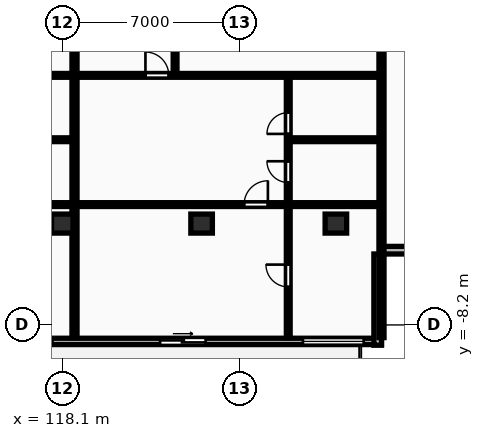
"""IFC4 building model, lengths in metres.
Left out: names, types, materials, properties, quantities, classifications, styles, units other than length and angle.
Written with IfcOpenShell. Run it as: python <this file> out.ifc"""

import sys

from ifc_helpers import new_model, si_unit, direction, frame, frame_2d, origin, origin_2d, place, context, subcontext, project, spatial, rectangle, extrude, element, fill, save


model = new_model("IFC4")
c1 = context("Model", 3, precision=1e-05, world=origin(), true_north=direction((0.0, 1.0)))
c2 = subcontext(c1, "Body", "Model", "MODEL_VIEW")
j1 = project(units=[si_unit("LENGTHUNIT", "METRE"), si_unit("PLANEANGLEUNIT", "RADIAN")], contexts=[c1])
p1 = place(None, origin())
s1 = spatial("IfcSite", under=j1, at=p1, CompositionType="ELEMENT")
p2 = place(p1, origin())
s2 = spatial("IfcBuilding", under=s1, at=p2, CompositionType="ELEMENT")
p3 = place(p2, frame((0.0, 0.0, 113.3)))
s3 = spatial("IfcBuildingStorey", under=s2, at=p3, CompositionType="ELEMENT", Elevation=113.3)
for number, where, z_axis, x_axis in (
    (1, (118.1, -4.2, 0.0), (0.0, 0.0, 1.0), (1.0, 0.0, 0.0)),
    (2, (123.6, -4.2, 0.0), (0.0, 0.0, 1.0), (1.0, 0.0, 0.0)),
    (3, (128.9, -4.2, 0.0), (0.0, 0.0, 1.0), (1.0, 0.0, 0.0)),
):
    element("IfcColumn", number, at=place(p3, frame(where, z_axis=z_axis, x_axis=x_axis)), inside=s3, PredefinedType="COLUMN", context=c2, shape_type="SweptSolid", body=[
        extrude(rectangle(XDim=0.85, YDim=0.75, at=origin_2d()), origin(), (0.0, 0.0, 1.0), 3.25),
    ])
p4 = place(p3, frame((72.7, -8.85, 0.0), z_axis=(0.0, 0.0, 1.0), x_axis=(1.0, 0.0, 0.0)))
e4 = element("IfcWall", 4, at=p4, inside=s3, PredefinedType="STANDARD", context=c2, shape_type="SweptSolid", body=[
    extrude(rectangle(XDim=58.0, YDim=0.25, at=frame_2d((29.0, 0.0))), origin(), (0.0, 0.0, 1.0), 2.97),
])
p5 = place(p4, frame((3.358, 0.0, 0.0)))
e5 = element("IfcOpeningElement", 5, at=p5, cuts=e4, PredefinedType="OPENING", context=c2, shape_type="SweptSolid", body=[
    extrude(rectangle(XDim=1.8, YDim=2.2, at=frame_2d((0.9, 1.1))), frame((0.0, 0.135, 0.0), z_axis=(0.0, -1.0, 0.0), x_axis=(1.0, 0.0, 0.0)), (0.0, 0.0, 1.0), 0.27),
])
p6 = place(p4, frame((12.755, 0.0, 0.85)))
e6 = element("IfcOpeningElement", 6, at=p6, cuts=e4, PredefinedType="OPENING", context=c2, shape_type="SweptSolid", body=[
    extrude(rectangle(XDim=2.4, YDim=1.9, at=frame_2d((1.2, 0.95))), frame((0.0, 0.135, 0.0), z_axis=(0.0, -1.0, 0.0), x_axis=(1.0, 0.0, 0.0)), (0.0, 0.0, 1.0), 0.27),
])
p7 = place(p4, frame((23.617, 0.0, 0.0)))
e7 = element("IfcOpeningElement", 7, at=p7, cuts=e4, PredefinedType="OPENING", context=c2, shape_type="SweptSolid", body=[
    extrude(rectangle(XDim=1.8, YDim=2.2, at=frame_2d((0.9, 1.1))), frame((0.0, 0.135, 0.0), z_axis=(0.0, -1.0, 0.0), x_axis=(1.0, 0.0, 0.0)), (0.0, 0.0, 1.0), 0.27),
])
p8 = place(p4, frame((29.705, 0.0, 0.85)))
e8 = element("IfcOpeningElement", 8, at=p8, cuts=e4, PredefinedType="OPENING", context=c2, shape_type="SweptSolid", body=[
    extrude(rectangle(XDim=1.8, YDim=1.8, at=frame_2d((0.9, 0.9))), frame((0.0, 0.135, 0.0), z_axis=(0.0, -1.0, 0.0), x_axis=(1.0, 0.0, 0.0)), (0.0, 0.0, 1.0), 0.27),
])
p9 = place(p4, frame((36.417, 0.0, 0.0)))
e9 = element("IfcOpeningElement", 9, at=p9, cuts=e4, PredefinedType="OPENING", context=c2, shape_type="SweptSolid", body=[
    extrude(rectangle(XDim=1.8, YDim=2.2, at=frame_2d((0.9, 1.1))), frame((0.0, 0.135, 0.0), z_axis=(0.0, -1.0, 0.0), x_axis=(1.0, 0.0, 0.0)), (0.0, 0.0, 1.0), 0.27),
])
p10 = place(p4, frame((43.213, 0.0, 0.85)))
e10 = element("IfcOpeningElement", 10, at=p10, cuts=e4, PredefinedType="OPENING", context=c2, shape_type="SweptSolid", body=[
    extrude(rectangle(XDim=1.8, YDim=1.8, at=frame_2d((0.9, 0.9))), frame((0.0, 0.135, 0.0), z_axis=(0.0, -1.0, 0.0), x_axis=(1.0, 0.0, 0.0)), (0.0, 0.0, 1.0), 0.27),
])
p11 = place(p4, frame((49.262, 0.0, 0.0)))
e11 = element("IfcOpeningElement", 11, at=p11, cuts=e4, PredefinedType="OPENING", context=c2, shape_type="SweptSolid", body=[
    extrude(rectangle(XDim=1.8, YDim=2.2, at=frame_2d((0.9, 1.1))), frame((0.0, 0.135, 0.0), z_axis=(0.0, -1.0, 0.0), x_axis=(1.0, 0.0, 0.0)), (0.0, 0.0, 1.0), 0.27),
])
p12 = place(p4, frame((54.9, 0.0, 0.85)))
e12 = element("IfcOpeningElement", 12, at=p12, cuts=e4, PredefinedType="OPENING", context=c2, shape_type="SweptSolid", body=[
    extrude(rectangle(XDim=2.4, YDim=1.9, at=frame_2d((1.2, 0.95))), frame((0.0, 0.135, 0.0), z_axis=(0.0, -1.0, 0.0), x_axis=(1.0, 0.0, 0.0)), (0.0, 0.0, 1.0), 0.27),
])
for number, where, z_axis, x_axis in (
    (13, (130.55, -9.0, 0.0), (0.0, 0.0, 1.0), (0.0, 1.0, 0.0)),
    (14, (130.7, -5.25, 0.0), (0.0, 0.0, 1.0), (1.0, 0.0, 0.0)),
):
    element("IfcWall", number, at=place(p3, frame(where, z_axis=z_axis, x_axis=x_axis)), inside=s3, PredefinedType="STANDARD", context=c2, shape_type="SweptSolid", body=[
        extrude(rectangle(XDim=3.6, YDim=0.3, at=frame_2d((1.8, 0.0))), origin(), (0.0, 0.0, 1.0), 2.97),
    ])
for number, where, z_axis, x_axis in (
    (15, (130.7, -8.7, 0.0), (0.0, 0.0, 1.0), (0.0, 1.0, 0.0)),
    (16, (118.583, -8.7, 0.0), (0.0, 0.0, 1.0), (0.0, 1.0, 0.0)),
):
    element("IfcWall", number, at=place(p3, frame(where, z_axis=z_axis, x_axis=x_axis)), inside=s3, PredefinedType="PARTITIONING", context=c2, shape_type="SweptSolid", body=[
        extrude(rectangle(XDim=24.57, YDim=0.2, at=frame_2d((12.285, 0.0))), origin(), (0.0, 0.0, 1.0), 2.97),
    ])
p13 = place(p3, frame((115.223, -0.89, 0.0), z_axis=(0.0, 0.0, 1.0), x_axis=(1.0, 0.0, 0.0)))
e17 = element("IfcWall", 17, at=p13, inside=s3, PredefinedType="PARTITIONING", context=c2, shape_type="SweptSolid", body=[
    extrude(rectangle(XDim=3.28, YDim=0.15, at=frame_2d((1.64, 0.0))), origin(), (0.0, 0.0, 1.0), 2.97),
])
p14 = place(p3, frame((104.83, 1.65, 0.0), z_axis=(0.0, 0.0, 1.0), x_axis=(1.0, 0.0, 0.0)))
e18 = element("IfcWall", 18, at=p14, inside=s3, PredefinedType="PARTITIONING", context=c2, shape_type="SweptSolid", body=[
    extrude(rectangle(XDim=13.673, YDim=0.15, at=frame_2d((6.837, 0.0))), origin(), (0.0, 0.0, 1.0), 2.97),
])
p15 = place(p14, frame((2.72, 0.0, 0.0)))
e19 = element("IfcOpeningElement", 19, at=p15, cuts=e18, PredefinedType="OPENING", context=c2, shape_type="SweptSolid", body=[
    extrude(rectangle(XDim=0.92, YDim=2.08, at=frame_2d((0.46, 1.04))), frame((0.0, 0.085, 0.0), z_axis=(0.0, -1.0, 0.0), x_axis=(1.0, 0.0, 0.0)), (0.0, 0.0, 1.0), 0.17),
])
p16 = place(p3, frame((104.83, -3.45, 0.0), z_axis=(0.0, 0.0, 1.0), x_axis=(1.0, 0.0, 0.0)))
e20 = element("IfcWall", 20, at=p16, inside=s3, PredefinedType="PARTITIONING", context=c2, shape_type="SweptSolid", body=[
    extrude(rectangle(XDim=13.673, YDim=0.15, at=frame_2d((6.837, 0.0))), origin(), (0.0, 0.0, 1.0), 2.97),
])
p17 = place(p16, frame((6.367, 0.0, 0.0)))
e21 = element("IfcOpeningElement", 21, at=p17, cuts=e20, PredefinedType="OPENING", context=c2, shape_type="SweptSolid", body=[
    extrude(rectangle(XDim=0.94, YDim=2.1, at=frame_2d((0.47, 1.05))), frame((0.0, 0.085, 0.0), z_axis=(0.0, -1.0, 0.0), x_axis=(1.0, 0.0, 0.0)), (0.0, 0.0, 1.0), 0.17),
])
p18 = place(p3, frame((122.553, 1.69, 0.0), z_axis=(0.0, 0.0, 1.0), x_axis=(0.0, 1.0, 0.0)))
e22 = element("IfcWall", 22, at=p18, inside=s3, PredefinedType="PARTITIONING", context=c2, shape_type="SweptSolid", body=[
    extrude(rectangle(XDim=14.2, YDim=0.15, at=frame_2d((7.1, 0.0))), origin(), (0.0, 0.0, 1.0), 2.97),
])
p19 = place(p18, frame((2.598, 0.0, 0.0)))
e23 = element("IfcOpeningElement", 23, at=p19, cuts=e22, PredefinedType="OPENING", context=c2, shape_type="SweptSolid", body=[
    extrude(rectangle(XDim=0.88, YDim=2.06, at=frame_2d((0.44, 1.03))), frame((0.0, 0.085, 0.0), z_axis=(0.0, -1.0, 0.0), x_axis=(1.0, 0.0, 0.0)), (0.0, 0.0, 1.0), 0.17),
])
p20 = place(p3, frame((127.08, -0.89, 0.0), z_axis=(0.0, 0.0, 1.0), x_axis=(1.0, 0.0, 0.0)))
e24 = element("IfcWall", 24, at=p20, inside=s3, PredefinedType="PARTITIONING", context=c2, shape_type="SweptSolid", body=[
    extrude(rectangle(XDim=3.54, YDim=0.15, at=frame_2d((1.77, 0.0))), origin(), (0.0, 0.0, 1.0), 2.97),
])
p21 = place(p3, frame((127.02, -8.7, 0.0), z_axis=(0.0, 0.0, 1.0), x_axis=(0.0, 1.0, 0.0)))
e25 = element("IfcWall", 25, at=p21, inside=s3, PredefinedType="PARTITIONING", context=c2, shape_type="SweptSolid", body=[
    extrude(rectangle(XDim=10.31, YDim=0.15, at=frame_2d((5.155, 0.0))), origin(), (0.0, 0.0, 1.0), 2.97),
])
p22 = place(p21, frame((6.12, 0.0, 0.0)))
e26 = element("IfcOpeningElement", 26, at=p22, cuts=e25, PredefinedType="OPENING", context=c2, shape_type="SweptSolid", body=[
    extrude(rectangle(XDim=0.84, YDim=2.04, at=frame_2d((0.42, 1.02))), frame((0.0, 0.085, 0.0), z_axis=(0.0, -1.0, 0.0), x_axis=(1.0, 0.0, 0.0)), (0.0, 0.0, 1.0), 0.17),
])
p23 = place(p21, frame((8.04, 0.0, 0.0)))
e27 = element("IfcOpeningElement", 27, at=p23, cuts=e25, PredefinedType="OPENING", context=c2, shape_type="SweptSolid", body=[
    extrude(rectangle(XDim=0.84, YDim=2.04, at=frame_2d((0.42, 1.02))), frame((0.0, 0.085, 0.0), z_axis=(0.0, -1.0, 0.0), x_axis=(1.0, 0.0, 0.0)), (0.0, 0.0, 1.0), 0.17),
])
p24 = place(p21, frame((2.001, 0.0, 0.0)))
e28 = element("IfcOpeningElement", 28, at=p24, cuts=e25, PredefinedType="OPENING", context=c2, shape_type="SweptSolid", body=[
    extrude(rectangle(XDim=0.88, YDim=2.06, at=frame_2d((0.44, 1.03))), frame((0.0, 0.085, 0.0), z_axis=(0.0, -1.0, 0.0), x_axis=(1.0, 0.0, 0.0)), (0.0, 0.0, 1.0), 0.17),
])
p25 = place(p3, frame((118.663, 1.65, 0.0), z_axis=(0.0, 0.0, 1.0), x_axis=(1.0, 0.0, 0.0)))
e29 = element("IfcWall", 29, at=p25, inside=s3, PredefinedType="PARTITIONING", context=c2, shape_type="SweptSolid", body=[
    extrude(rectangle(XDim=11.957, YDim=0.15, at=frame_2d((5.979, 0.0))), origin(), (0.0, 0.0, 1.0), 2.97),
])
p26 = place(p25, frame((2.72, 0.0, 0.0)))
e30 = element("IfcOpeningElement", 30, at=p26, cuts=e29, PredefinedType="OPENING", context=c2, shape_type="SweptSolid", body=[
    extrude(rectangle(XDim=0.92, YDim=2.08, at=frame_2d((0.46, 1.04))), frame((0.0, 0.085, 0.0), z_axis=(0.0, -1.0, 0.0), x_axis=(1.0, 0.0, 0.0)), (0.0, 0.0, 1.0), 0.17),
])
p27 = place(p3, frame((118.663, -3.45, 0.0), z_axis=(0.0, 0.0, 1.0), x_axis=(1.0, 0.0, 0.0)))
e31 = element("IfcWall", 31, at=p27, inside=s3, PredefinedType="PARTITIONING", context=c2, shape_type="SweptSolid", body=[
    extrude(rectangle(XDim=11.957, YDim=0.15, at=frame_2d((5.979, 0.0))), origin(), (0.0, 0.0, 1.0), 2.97),
])
p28 = place(p27, frame((6.613, 0.0, 0.0)))
e32 = element("IfcOpeningElement", 32, at=p28, cuts=e31, PredefinedType="OPENING", context=c2, shape_type="SweptSolid", body=[
    extrude(rectangle(XDim=0.94, YDim=2.1, at=frame_2d((0.47, 1.05))), frame((0.0, 0.085, 0.0), z_axis=(0.0, -1.0, 0.0), x_axis=(1.0, 0.0, 0.0)), (0.0, 0.0, 1.0), 0.17),
])
p29 = place(p10, origin())
e33 = element("IfcWindow", 33, at=p29, inside=s3, PartitioningType="SINGLE_PANEL", PredefinedType="WINDOW", context=c2, shape_type="SweptSolid", body=[
    extrude(rectangle(XDim=1.8, YDim=1.8, at=frame_2d((0.9, 0.9))), frame((0.0, 0.03, 0.0), z_axis=(0.0, -1.0, 0.0), x_axis=(1.0, 0.0, 0.0)), (0.0, 0.0, 1.0), 0.06),
])
fill(e10, e33)
p30 = place(p11, origin())
e34 = element("IfcDoor", 34, at=p30, inside=s3, OperationType="SLIDING_TO_RIGHT", PredefinedType="DOOR", context=c2, shape_type="SweptSolid", body=[
    extrude(rectangle(XDim=1.8, YDim=2.2, at=frame_2d((0.9, 1.1))), frame((0.0, 0.025, 0.0), z_axis=(0.0, -1.0, 0.0), x_axis=(1.0, 0.0, 0.0)), (0.0, 0.0, 1.0), 0.05),
])
fill(e11, e34)
p31 = place(p12, origin())
e35 = element("IfcWindow", 35, at=p31, inside=s3, PartitioningType="DOUBLE_PANEL_VERTICAL", PredefinedType="WINDOW", context=c2, shape_type="SweptSolid", body=[
    extrude(rectangle(XDim=2.4, YDim=1.9, at=frame_2d((1.2, 0.95))), frame((0.0, 0.03, 0.0), z_axis=(0.0, -1.0, 0.0), x_axis=(1.0, 0.0, 0.0)), (0.0, 0.0, 1.0), 0.06),
])
fill(e12, e35)
p32 = place(p22, origin())
e36 = element("IfcDoor", 36, at=p32, inside=s3, OperationType="SINGLE_SWING_RIGHT", PredefinedType="DOOR", context=c2, shape_type="SweptSolid", body=[
    extrude(rectangle(XDim=0.84, YDim=2.04, at=frame_2d((0.42, 1.02))), frame((0.0, 0.025, 0.0), z_axis=(0.0, -1.0, 0.0), x_axis=(1.0, 0.0, 0.0)), (0.0, 0.0, 1.0), 0.05),
])
fill(e26, e36)
p33 = place(p23, origin())
e37 = element("IfcDoor", 37, at=p33, inside=s3, OperationType="SINGLE_SWING_LEFT", PredefinedType="DOOR", context=c2, shape_type="SweptSolid", body=[
    extrude(rectangle(XDim=0.84, YDim=2.04, at=frame_2d((0.42, 1.02))), frame((0.0, 0.025, 0.0), z_axis=(0.0, -1.0, 0.0), x_axis=(1.0, 0.0, 0.0)), (0.0, 0.0, 1.0), 0.05),
])
fill(e27, e37)
p34 = place(p24, origin())
e38 = element("IfcDoor", 38, at=p34, inside=s3, OperationType="SINGLE_SWING_RIGHT", PredefinedType="DOOR", context=c2, shape_type="SweptSolid", body=[
    extrude(rectangle(XDim=0.88, YDim=2.06, at=frame_2d((0.44, 1.03))), frame((0.0, 0.025, 0.0), z_axis=(0.0, -1.0, 0.0), x_axis=(1.0, 0.0, 0.0)), (0.0, 0.0, 1.0), 0.05),
])
fill(e28, e38)
p35 = place(p26, origin())
e39 = element("IfcDoor", 39, at=p35, inside=s3, OperationType="SINGLE_SWING_LEFT", PredefinedType="DOOR", context=c2, shape_type="SweptSolid", body=[
    extrude(rectangle(XDim=0.92, YDim=2.08, at=frame_2d((0.46, 1.04))), frame((0.0, 0.025, 0.0), z_axis=(0.0, -1.0, 0.0), x_axis=(1.0, 0.0, 0.0)), (0.0, 0.0, 1.0), 0.05),
])
fill(e30, e39)
p36 = place(p28, origin())
e40 = element("IfcDoor", 40, at=p36, inside=s3, OperationType="SINGLE_SWING_RIGHT", PredefinedType="DOOR", context=c2, shape_type="SweptSolid", body=[
    extrude(rectangle(XDim=0.94, YDim=2.1, at=frame_2d((0.47, 1.05))), frame((0.0, 0.025, 0.0), z_axis=(0.0, -1.0, 0.0), x_axis=(1.0, 0.0, 0.0)), (0.0, 0.0, 1.0), 0.05),
])
fill(e32, e40)
save(model, sys.argv[1])
